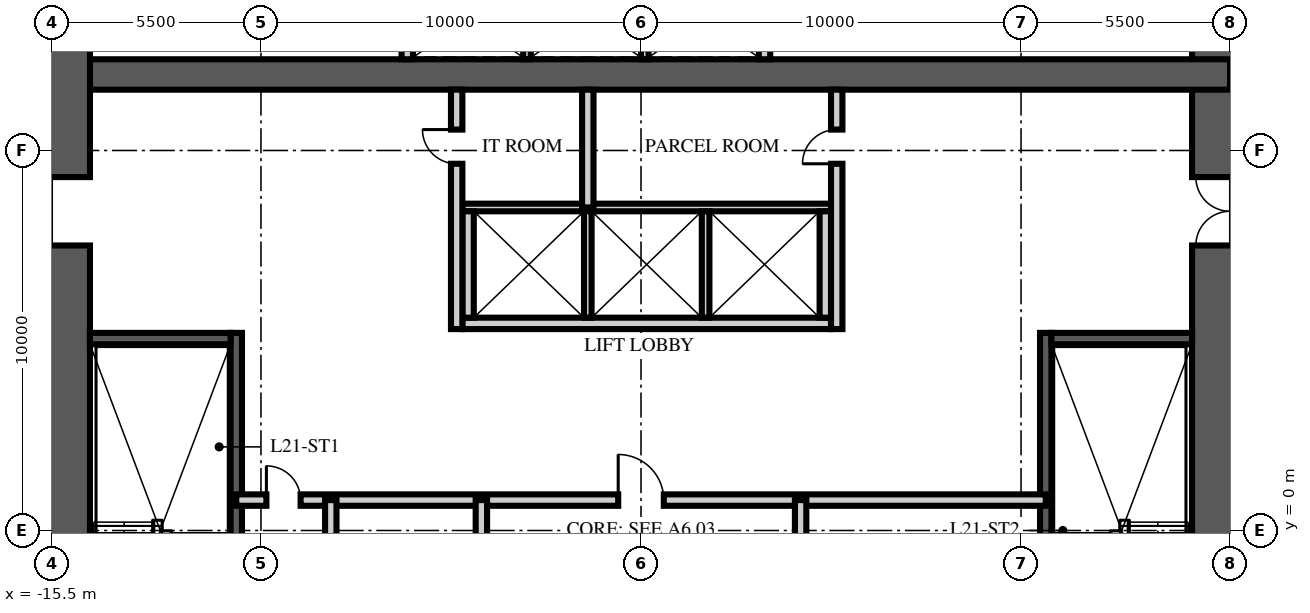
"""IFC4 building model, lengths in metres.
Left out: names, types, materials, properties, quantities, classifications, styles, units other than length and angle.
Written with IfcOpenShell. Run it as: python <this file> out.ifc"""

import sys

from ifc_helpers import new_model, si_unit, direction, frame, frame_2d, origin, place, context, subcontext, project, spatial, rectangle, extrude, element, fill, save


model = new_model("IFC4")
c1 = context("Model", 3, precision=1e-05, world=origin(), true_north=direction((0.0, 1.0)))
c2 = subcontext(c1, "Body", "Model", "MODEL_VIEW")
j1 = project(units=[si_unit("LENGTHUNIT", "METRE"), si_unit("PLANEANGLEUNIT", "RADIAN")], contexts=[c1])
p1 = place(None, origin())
s1 = spatial("IfcSite", under=j1, at=p1, CompositionType="ELEMENT")
p2 = place(p1, origin())
s2 = spatial("IfcBuilding", under=s1, at=p2, CompositionType="ELEMENT")
p3 = place(p2, frame((0.0, 0.0, 84.75)))
s3 = spatial("IfcBuildingStorey", under=s2, at=p3, CompositionType="ELEMENT", Elevation=84.75)
p4 = place(p3, frame((15.5, -15.5, -0.25), z_axis=(0.0, 0.0, 1.0), x_axis=(0.0, 1.0, 0.0)))
e1 = element("IfcWall", 1, at=p4, inside=s3, PredefinedType="SHEAR", context=c2, shape_type="SweptSolid", body=[
    extrude(rectangle(XDim=31.0, YDim=2.0, at=frame_2d((15.5, 0.0))), origin(), (0.0, 0.0, 1.0), 3.75),
])
p5 = place(p4, frame((6.5, 0.0, 0.25)))
e2 = element("IfcOpeningElement", 2, at=p5, cuts=e1, PredefinedType="OPENING", context=c2, shape_type="SweptSolid", body=[
    extrude(rectangle(XDim=1.2, YDim=2.1, at=frame_2d((0.6, 1.05))), frame((0.0, 1.01, 0.0), z_axis=(0.0, -1.0, 0.0), x_axis=(1.0, 0.0, 0.0)), (0.0, 0.0, 1.0), 2.02),
])
p6 = place(p4, frame((23.0, 0.0, 0.25)))
e3 = element("IfcOpeningElement", 3, at=p6, cuts=e1, PredefinedType="OPENING", context=c2, shape_type="SweptSolid", body=[
    extrude(rectangle(XDim=1.8, YDim=2.1, at=frame_2d((0.9, 1.05))), frame((0.0, 1.01, 0.0), z_axis=(0.0, -1.0, 0.0), x_axis=(1.0, 0.0, 0.0)), (0.0, 0.0, 1.0), 2.02),
])
p7 = place(p3, frame((-15.5, 12.0, -0.25), z_axis=(0.0, 0.0, 1.0), x_axis=(1.0, 0.0, 0.0)))
e4 = element("IfcWall", 4, at=p7, inside=s3, PredefinedType="SHEAR", context=c2, shape_type="SweptSolid", body=[
    extrude(rectangle(XDim=31.0, YDim=0.8, at=frame_2d((15.5, 0.0))), origin(), (0.0, 0.0, 1.0), 3.75),
])
p8 = place(p3, frame((-15.5, -15.5, -0.25), z_axis=(0.0, 0.0, 1.0), x_axis=(0.0, 1.0, 0.0)))
e5 = element("IfcWall", 5, at=p8, inside=s3, PredefinedType="SHEAR", context=c2, shape_type="SweptSolid", body=[
    extrude(rectangle(XDim=31.0, YDim=2.0, at=frame_2d((15.5, 0.0))), origin(), (0.0, 0.0, 1.0), 3.75),
])
p9 = place(p8, frame((6.5, 0.0, 0.25)))
e6 = element("IfcOpeningElement", 6, at=p9, cuts=e5, PredefinedType="OPENING", context=c2, shape_type="SweptSolid", body=[
    extrude(rectangle(XDim=1.2, YDim=2.1, at=frame_2d((0.6, 1.05))), frame((0.0, 1.01, 0.0), z_axis=(0.0, -1.0, 0.0), x_axis=(1.0, 0.0, 0.0)), (0.0, 0.0, 1.0), 2.02),
])
p10 = place(p8, frame((23.0, 0.0, 0.25)))
e7 = element("IfcOpeningElement", 7, at=p10, cuts=e5, PredefinedType="OPENING", context=c2, shape_type="SweptSolid", body=[
    extrude(rectangle(XDim=1.8, YDim=2.1, at=frame_2d((0.9, 1.05))), frame((0.0, 1.01, 0.0), z_axis=(0.0, -1.0, 0.0), x_axis=(1.0, 0.0, 0.0)), (0.0, 0.0, 1.0), 2.02),
])
p11 = place(p3, frame((-10.65, -4.9, 0.0), z_axis=(0.0, 0.0, 1.0), x_axis=(0.0, 1.0, 0.0)))
e8 = element("IfcWall", 8, at=p11, inside=s3, PredefinedType="SOLIDWALL", context=c2, shape_type="SweptSolid", body=[
    extrude(rectangle(XDim=10.1, YDim=0.3, at=frame_2d((5.05, 0.0))), origin(), (0.0, 0.0, 1.0), 3.5),
])
p12 = place(p3, frame((-14.5, 5.05, 0.0), z_axis=(0.0, 0.0, 1.0), x_axis=(1.0, 0.0, 0.0)))
e9 = element("IfcWall", 9, at=p12, inside=s3, PredefinedType="SOLIDWALL", context=c2, shape_type="SweptSolid", body=[
    extrude(rectangle(XDim=3.7, YDim=0.3, at=frame_2d((1.85, 0.0))), origin(), (0.0, 0.0, 1.0), 3.5),
])
p13 = place(p3, frame((10.65, -4.9, 0.0), z_axis=(0.0, 0.0, 1.0), x_axis=(0.0, 1.0, 0.0)))
e10 = element("IfcWall", 10, at=p13, inside=s3, PredefinedType="SOLIDWALL", context=c2, shape_type="SweptSolid", body=[
    extrude(rectangle(XDim=10.1, YDim=0.3, at=frame_2d((5.05, 0.0))), origin(), (0.0, 0.0, 1.0), 3.5),
])
p14 = place(p3, frame((14.5, 5.05, 0.0), z_axis=(0.0, 0.0, 1.0), x_axis=(-1.0, 0.0, 0.0)))
e11 = element("IfcWall", 11, at=p14, inside=s3, PredefinedType="SOLIDWALL", context=c2, shape_type="SweptSolid", body=[
    extrude(rectangle(XDim=3.7, YDim=0.3, at=frame_2d((1.85, 0.0))), origin(), (0.0, 0.0, 1.0), 3.5),
])
p15 = place(p3, frame((-4.7, 5.45, 0.0), z_axis=(0.0, 0.0, 1.0), x_axis=(1.0, 0.0, 0.0)))
e12 = element("IfcWall", 12, at=p15, inside=s3, PredefinedType="PARTITIONING", context=c2, shape_type="SweptSolid", body=[
    extrude(rectangle(XDim=9.7, YDim=0.3, at=frame_2d((4.85, 0.0))), origin(), (0.0, 0.0, 1.0), 3.5),
])
p16 = place(p3, frame((-4.7, 8.5, 0.0), z_axis=(0.0, 0.0, 1.0), x_axis=(1.0, 0.0, 0.0)))
e13 = element("IfcWall", 13, at=p16, inside=s3, PredefinedType="PARTITIONING", context=c2, shape_type="SweptSolid", body=[
    extrude(rectangle(XDim=9.7, YDim=0.2, at=frame_2d((4.85, 0.0))), origin(), (0.0, 0.0, 1.0), 3.5),
])
for number, where, z_axis, x_axis in (
    (14, (-4.55, 5.6, 0.0), (0.0, 0.0, 1.0), (0.0, 1.0, 0.0)),
    (15, (4.85, 5.6, 0.0), (0.0, 0.0, 1.0), (0.0, 1.0, 0.0)),
):
    element("IfcWall", number, at=place(p3, frame(where, z_axis=z_axis, x_axis=x_axis)), inside=s3, PredefinedType="PARTITIONING", context=c2, shape_type="SweptSolid", body=[
        extrude(rectangle(XDim=2.8, YDim=0.3, at=frame_2d((1.4, 0.0))), origin(), (0.0, 0.0, 1.0), 3.5),
    ])
for number, where, z_axis, x_axis in (
    (16, (-1.4, 5.6, 0.0), (0.0, 0.0, 1.0), (0.0, 1.0, 0.0)),
    (17, (1.7, 5.6, 0.0), (0.0, 0.0, 1.0), (0.0, 1.0, 0.0)),
):
    element("IfcWall", number, at=place(p3, frame(where, z_axis=z_axis, x_axis=x_axis)), inside=s3, PredefinedType="PARTITIONING", context=c2, shape_type="SweptSolid", body=[
        extrude(rectangle(XDim=2.8, YDim=0.2, at=frame_2d((1.4, 0.0))), origin(), (0.0, 0.0, 1.0), 3.5),
    ])
for number, where, z_axis, x_axis in (
    (18, (-6.15, 12.4, 0.0), (0.0, 0.0, 1.0), (0.0, 1.0, 0.0)),
    (19, (3.25, 12.4, 0.0), (0.0, 0.0, 1.0), (0.0, 1.0, 0.0)),
):
    element("IfcWall", number, at=place(p3, frame(where, z_axis=z_axis, x_axis=x_axis)), inside=s3, PredefinedType="PARTITIONING", context=c2, shape_type="SweptSolid", body=[
        extrude(rectangle(XDim=2.1, YDim=0.3, at=frame_2d((1.05, 0.0))), origin(), (0.0, 0.0, 1.0), 3.5),
    ])
for number, where, z_axis, x_axis in (
    (20, (-3.0, 12.4, 0.0), (0.0, 0.0, 1.0), (0.0, 1.0, 0.0)),
    (21, (0.1, 12.4, 0.0), (0.0, 0.0, 1.0), (0.0, 1.0, 0.0)),
):
    element("IfcWall", number, at=place(p3, frame(where, z_axis=z_axis, x_axis=x_axis)), inside=s3, PredefinedType="PARTITIONING", context=c2, shape_type="SweptSolid", body=[
        extrude(rectangle(XDim=2.1, YDim=0.2, at=frame_2d((1.05, 0.0))), origin(), (0.0, 0.0, 1.0), 3.5),
    ])
p17 = place(p3, frame((-10.65, 0.8, 0.0), z_axis=(0.0, 0.0, 1.0), x_axis=(1.0, 0.0, 0.0)))
e22 = element("IfcWall", 22, at=p17, inside=s3, PredefinedType="PARTITIONING", context=c2, shape_type="SweptSolid", body=[
    extrude(rectangle(XDim=21.3, YDim=0.3, at=frame_2d((10.65, 0.0))), origin(), (0.0, 0.0, 1.0), 3.5),
])
p18 = place(p17, frame((10.05, 0.0, 0.0)))
e23 = element("IfcOpeningElement", 23, at=p18, cuts=e22, PredefinedType="OPENING", context=c2, shape_type="SweptSolid", body=[
    extrude(rectangle(XDim=1.2, YDim=2.1, at=frame_2d((0.6, 1.05))), frame((0.0, 0.16, 0.0), z_axis=(0.0, -1.0, 0.0), x_axis=(1.0, 0.0, 0.0)), (0.0, 0.0, 1.0), 0.32),
])
p19 = place(p17, frame((0.793, 0.0, 0.0)))
e24 = element("IfcOpeningElement", 24, at=p19, cuts=e22, PredefinedType="OPENING", context=c2, shape_type="SweptSolid", body=[
    extrude(rectangle(XDim=0.9, YDim=2.1, at=frame_2d((0.45, 1.05))), frame((0.0, 0.16, 0.0), z_axis=(0.0, -1.0, 0.0), x_axis=(1.0, 0.0, 0.0)), (0.0, 0.0, 1.0), 0.32),
])
p20 = place(p3, frame((-4.2, -6.65, 0.0), z_axis=(0.0, 0.0, 1.0), x_axis=(0.0, 1.0, 0.0)))
e25 = element("IfcWall", 25, at=p20, inside=s3, PredefinedType="PARTITIONING", context=c2, shape_type="SweptSolid", body=[
    extrude(rectangle(XDim=7.45, YDim=0.3, at=frame_2d((3.725, 0.0))), origin(), (0.0, 0.0, 1.0), 3.5),
])
p21 = place(p20, frame((3.275, 0.0, 0.0)))
e26 = element("IfcOpeningElement", 26, at=p21, cuts=e25, PredefinedType="OPENING", context=c2, shape_type="SweptSolid", body=[
    extrude(rectangle(XDim=0.9, YDim=2.1, at=frame_2d((0.45, 1.05))), frame((0.0, 0.16, 0.0), z_axis=(0.0, -1.0, 0.0), x_axis=(1.0, 0.0, 0.0)), (0.0, 0.0, 1.0), 0.32),
])
p22 = place(p3, frame((4.2, -6.65, 0.0), z_axis=(0.0, 0.0, 1.0), x_axis=(0.0, 1.0, 0.0)))
e27 = element("IfcWall", 27, at=p22, inside=s3, PredefinedType="PARTITIONING", context=c2, shape_type="SweptSolid", body=[
    extrude(rectangle(XDim=7.45, YDim=0.3, at=frame_2d((3.725, 0.0))), origin(), (0.0, 0.0, 1.0), 3.5),
])
p23 = place(p22, frame((0.866, 0.0, 0.0)))
e28 = element("IfcOpeningElement", 28, at=p23, cuts=e27, PredefinedType="OPENING", context=c2, shape_type="SweptSolid", body=[
    extrude(rectangle(XDim=0.9, YDim=2.1, at=frame_2d((0.45, 1.05))), frame((0.0, 0.16, 0.0), z_axis=(0.0, -1.0, 0.0), x_axis=(1.0, 0.0, 0.0)), (0.0, 0.0, 1.0), 0.32),
])
p24 = place(p22, frame((4.591, 0.0, 0.0)))
e29 = element("IfcOpeningElement", 29, at=p24, cuts=e27, PredefinedType="OPENING", context=c2, shape_type="SweptSolid", body=[
    extrude(rectangle(XDim=0.9, YDim=2.1, at=frame_2d((0.45, 1.05))), frame((0.0, 0.16, 0.0), z_axis=(0.0, -1.0, 0.0), x_axis=(1.0, 0.0, 0.0)), (0.0, 0.0, 1.0), 0.32),
])
p25 = place(p3, frame((-8.163, -6.65, 0.0), z_axis=(0.0, 0.0, 1.0), x_axis=(0.0, 1.0, 0.0)))
e30 = element("IfcWall", 30, at=p25, inside=s3, PredefinedType="PARTITIONING", context=c2, shape_type="SweptSolid", body=[
    extrude(rectangle(XDim=7.45, YDim=0.3, at=frame_2d((3.725, 0.0))), origin(), (0.0, 0.0, 1.0), 3.5),
])
p26 = place(p3, frame((-4.85, 5.3, 0.0), z_axis=(0.0, 0.0, 1.0), x_axis=(0.0, 1.0, 0.0)))
e31 = element("IfcWall", 31, at=p26, inside=s3, PredefinedType="PARTITIONING", context=c2, shape_type="SweptSolid", body=[
    extrude(rectangle(XDim=6.3, YDim=0.3, at=frame_2d((3.15, 0.0))), origin(), (0.0, 0.0, 1.0), 3.5),
])
p27 = place(p26, frame((4.35, 0.0, 0.0)))
e32 = element("IfcOpeningElement", 32, at=p27, cuts=e31, PredefinedType="OPENING", context=c2, shape_type="SweptSolid", body=[
    extrude(rectangle(XDim=0.9, YDim=2.1, at=frame_2d((0.45, 1.05))), frame((0.0, 0.16, 0.0), z_axis=(0.0, -1.0, 0.0), x_axis=(1.0, 0.0, 0.0)), (0.0, 0.0, 1.0), 0.32),
])
p28 = place(p3, frame((5.15, 5.3, 0.0), z_axis=(0.0, 0.0, 1.0), x_axis=(0.0, 1.0, 0.0)))
e33 = element("IfcWall", 33, at=p28, inside=s3, PredefinedType="PARTITIONING", context=c2, shape_type="SweptSolid", body=[
    extrude(rectangle(XDim=6.3, YDim=0.3, at=frame_2d((3.15, 0.0))), origin(), (0.0, 0.0, 1.0), 3.5),
])
p29 = place(p28, frame((4.35, 0.0, 0.0)))
e34 = element("IfcOpeningElement", 34, at=p29, cuts=e33, PredefinedType="OPENING", context=c2, shape_type="SweptSolid", body=[
    extrude(rectangle(XDim=0.9, YDim=2.1, at=frame_2d((0.45, 1.05))), frame((0.0, 0.16, 0.0), z_axis=(0.0, -1.0, 0.0), x_axis=(1.0, 0.0, 0.0)), (0.0, 0.0, 1.0), 0.32),
])
p30 = place(p3, frame((-1.4, 8.5, 0.0), z_axis=(0.0, 0.0, 1.0), x_axis=(0.0, 1.0, 0.0)))
e35 = element("IfcWall", 35, at=p30, inside=s3, PredefinedType="PARTITIONING", context=c2, shape_type="SweptSolid", body=[
    extrude(rectangle(XDim=3.1, YDim=0.3, at=frame_2d((1.55, 0.0))), origin(), (0.0, 0.0, 1.0), 3.5),
])
p31 = place(p10, origin())
e36 = element("IfcDoor", 36, at=p31, inside=s3, OperationType="DOUBLE_DOOR_SINGLE_SWING", PredefinedType="DOOR", context=c2, shape_type="SweptSolid", body=[
    extrude(rectangle(XDim=1.8, YDim=2.1, at=frame_2d((0.9, 1.05))), frame((0.0, 0.025, 0.0), z_axis=(0.0, -1.0, 0.0), x_axis=(1.0, 0.0, 0.0)), (0.0, 0.0, 1.0), 0.05),
])
fill(e7, e36)
p32 = place(p6, origin())
e37 = element("IfcDoor", 37, at=p32, inside=s3, OperationType="DOUBLE_DOOR_SINGLE_SWING", PredefinedType="DOOR", context=c2, shape_type="SweptSolid", body=[
    extrude(rectangle(XDim=1.8, YDim=2.1, at=frame_2d((0.9, 1.05))), frame((0.0, 0.025, 0.0), z_axis=(0.0, -1.0, 0.0), x_axis=(1.0, 0.0, 0.0)), (0.0, 0.0, 1.0), 0.05),
])
fill(e3, e37)
p33 = place(p18, origin())
e38 = element("IfcDoor", 38, at=p33, inside=s3, OperationType="SINGLE_SWING_LEFT", PredefinedType="DOOR", context=c2, shape_type="SweptSolid", body=[
    extrude(rectangle(XDim=1.2, YDim=2.1, at=frame_2d((0.6, 1.05))), frame((0.0, 0.025, 0.0), z_axis=(0.0, -1.0, 0.0), x_axis=(1.0, 0.0, 0.0)), (0.0, 0.0, 1.0), 0.05),
])
fill(e23, e38)
p34 = place(p19, origin())
e39 = element("IfcDoor", 39, at=p34, inside=s3, OperationType="SINGLE_SWING_LEFT", PredefinedType="DOOR", context=c2, shape_type="SweptSolid", body=[
    extrude(rectangle(XDim=0.9, YDim=2.1, at=frame_2d((0.45, 1.05))), frame((0.0, 0.025, 0.0), z_axis=(0.0, -1.0, 0.0), x_axis=(1.0, 0.0, 0.0)), (0.0, 0.0, 1.0), 0.05),
])
fill(e24, e39)
p35 = place(p27, origin())
e40 = element("IfcDoor", 40, at=p35, inside=s3, OperationType="SINGLE_SWING_RIGHT", PredefinedType="DOOR", context=c2, shape_type="SweptSolid", body=[
    extrude(rectangle(XDim=0.9, YDim=2.1, at=frame_2d((0.45, 1.05))), frame((0.0, 0.025, 0.0), z_axis=(0.0, -1.0, 0.0), x_axis=(1.0, 0.0, 0.0)), (0.0, 0.0, 1.0), 0.05),
])
fill(e32, e40)
p36 = place(p29, origin())
e41 = element("IfcDoor", 41, at=p36, inside=s3, OperationType="SINGLE_SWING_LEFT", PredefinedType="DOOR", context=c2, shape_type="SweptSolid", body=[
    extrude(rectangle(XDim=0.9, YDim=2.1, at=frame_2d((0.45, 1.05))), frame((0.0, 0.025, 0.0), z_axis=(0.0, -1.0, 0.0), x_axis=(1.0, 0.0, 0.0)), (0.0, 0.0, 1.0), 0.05),
])
fill(e34, e41)
save(model, sys.argv[1])
